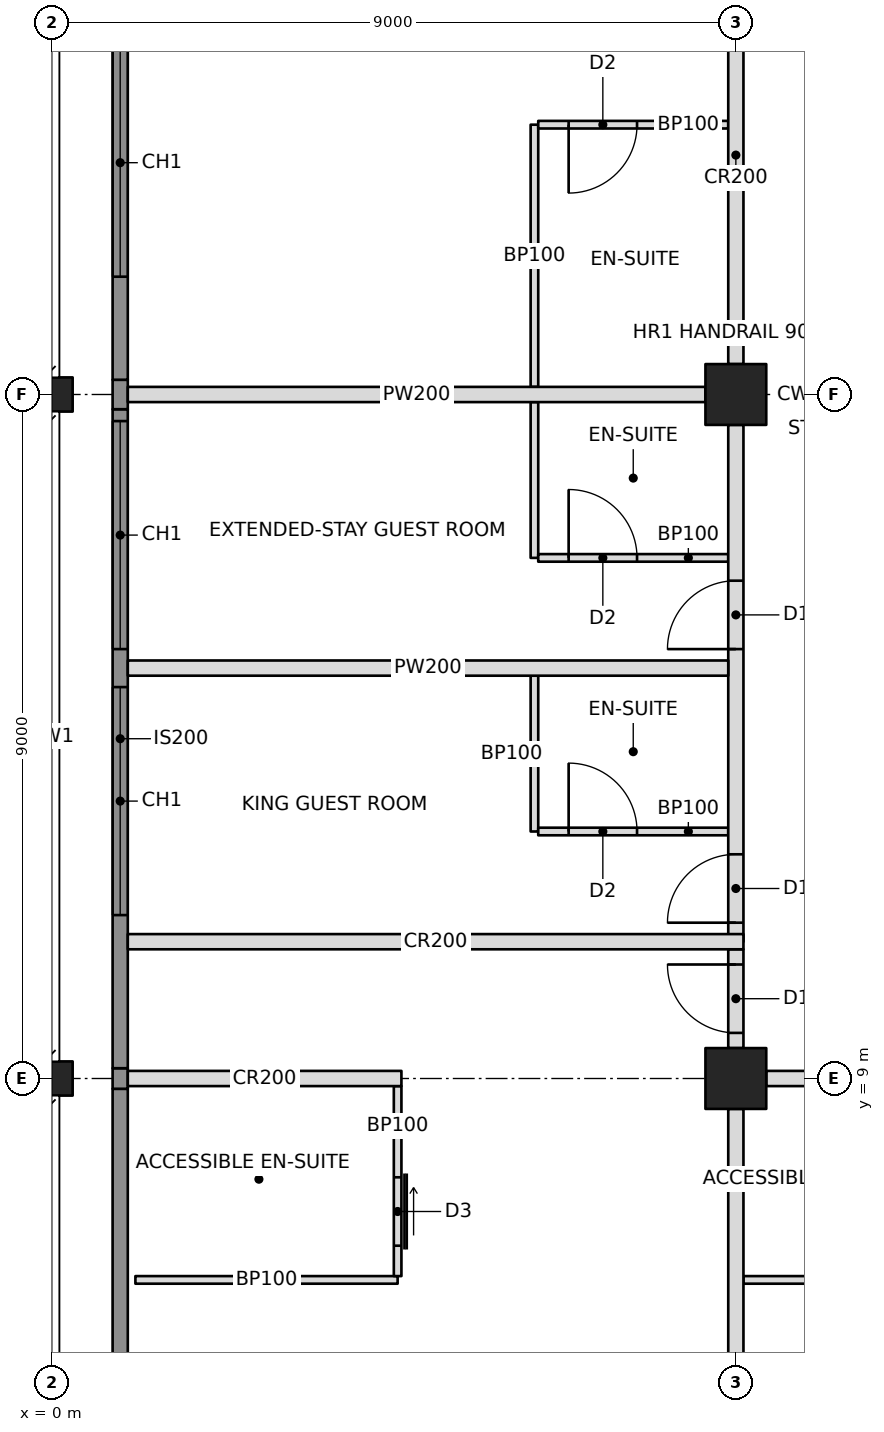
"""IFC4 building model, lengths in metres.
Left out: names, types, materials, properties, quantities, classifications, styles, units other than length and angle.
Written with IfcOpenShell. Run it as: python <this file> out.ifc"""

import sys

from ifc_helpers import new_model, si_unit, direction, frame, frame_2d, origin, origin_2d, place, context, subcontext, project, spatial, rectangle, hollow_rectangle, i_section, extrude, element, fill, save


model = new_model("IFC4")
c1 = context("Model", 3, precision=1e-05, world=origin(), true_north=direction((0.0, 1.0)))
c2 = subcontext(c1, "Body", "Model", "MODEL_VIEW")
j1 = project(units=[si_unit("LENGTHUNIT", "METRE"), si_unit("PLANEANGLEUNIT", "RADIAN")], contexts=[c1])
p1 = place(None, origin())
s1 = spatial("IfcSite", under=j1, at=p1, CompositionType="ELEMENT")
p2 = place(p1, origin())
s2 = spatial("IfcBuilding", under=s1, at=p2, CompositionType="ELEMENT")
p3 = place(p2, frame((0.0, 0.0, 167.2)))
s3 = spatial("IfcBuildingStorey", under=s2, at=p3, CompositionType="ELEMENT", Elevation=167.2)
for number, where, z_axis, x_axis in (
    (1, (0.0, 9.0, 0.0), (0.0, 0.0, 1.0), (0.0, 1.0, 0.0)),
    (2, (0.0, 18.0, 0.0), (0.0, 0.0, 1.0), (0.0, 1.0, 0.0)),
):
    element("IfcColumn", number, at=place(p3, frame(where, z_axis=z_axis, x_axis=x_axis)), inside=s3, PredefinedType="COLUMN", context=c2, shape_type="SweptSolid", body=[
        extrude(i_section(OverallWidth=0.449, OverallDepth=0.549, WebThickness=0.072, FlangeThickness=0.115, at=origin_2d()), origin(), (0.0, 0.0, 1.0), 3.4),
    ])
for number, where, z_axis, x_axis in (
    (3, (9.0, 9.0, 0.0), (0.0, 0.0, 1.0), (1.0, 0.0, 0.0)),
    (4, (9.0, 18.0, 0.0), (0.0, 0.0, 1.0), (1.0, 0.0, 0.0)),
):
    element("IfcColumn", number, at=place(p3, frame(where, z_axis=z_axis, x_axis=x_axis)), inside=s3, PredefinedType="COLUMN", context=c2, shape_type="SweptSolid", body=[
        extrude(hollow_rectangle(XDim=0.8, YDim=0.8, WallThickness=0.06, at=origin_2d()), origin(), (0.0, 0.0, 1.0), 3.4),
    ])
p4 = place(p3, frame((1.0, 9.0, 0.0), z_axis=(0.0, 0.0, 1.0), x_axis=(1.0, 0.0, 0.0)))
e5 = element("IfcWall", 5, at=p4, inside=s3, PredefinedType="PARTITIONING", context=c2, shape_type="SweptSolid", body=[
    extrude(rectangle(XDim=3.6, YDim=0.2, at=frame_2d((1.8, 0.0))), origin(), (0.0, 0.0, 1.0), 2.438),
])
p5 = place(p3, frame((9.4, 9.0, 0.0), z_axis=(0.0, 0.0, 1.0), x_axis=(1.0, 0.0, 0.0)))
e6 = element("IfcWall", 6, at=p5, inside=s3, PredefinedType="PARTITIONING", context=c2, shape_type="SweptSolid", body=[
    extrude(rectangle(XDim=8.2, YDim=0.2, at=frame_2d((4.1, 0.0))), origin(), (0.0, 0.0, 1.0), 2.405),
])
p6 = place(p5, frame((2.95, 0.0, 0.0)))
e7 = element("IfcOpeningElement", 7, at=p6, cuts=e6, PredefinedType="OPENING", context=c2, shape_type="SweptSolid", body=[
    extrude(rectangle(XDim=0.9, YDim=2.1, at=frame_2d((0.45, 1.05))), frame((0.0, 0.11, 0.0), z_axis=(0.0, -1.0, 0.0), x_axis=(1.0, 0.0, 0.0)), (0.0, 0.0, 1.0), 0.22),
])
p7 = place(p5, frame((4.35, 0.0, 0.0)))
e8 = element("IfcOpeningElement", 8, at=p7, cuts=e6, PredefinedType="OPENING", context=c2, shape_type="SweptSolid", body=[
    extrude(rectangle(XDim=0.9, YDim=2.1, at=frame_2d((0.45, 1.05))), frame((0.0, 0.11, 0.0), z_axis=(0.0, -1.0, 0.0), x_axis=(1.0, 0.0, 0.0)), (0.0, 0.0, 1.0), 0.22),
])
p8 = place(p3, frame((9.0, 10.8, 0.0), z_axis=(0.0, 0.0, 1.0), x_axis=(0.0, 1.0, 0.0)))
e9 = element("IfcWall", 9, at=p8, inside=s3, PredefinedType="PARTITIONING", context=c2, shape_type="SweptSolid", body=[
    extrude(rectangle(XDim=6.8, YDim=0.2, at=frame_2d((3.4, 0.0))), origin(), (0.0, 0.0, 1.0), 2.405),
])
p9 = place(p8, frame((0.25, 0.0, 0.0)))
e10 = element("IfcOpeningElement", 10, at=p9, cuts=e9, PredefinedType="OPENING", context=c2, shape_type="SweptSolid", body=[
    extrude(rectangle(XDim=0.9, YDim=2.1, at=frame_2d((0.45, 1.05))), frame((0.0, 0.11, 0.0), z_axis=(0.0, -1.0, 0.0), x_axis=(1.0, 0.0, 0.0)), (0.0, 0.0, 1.0), 0.22),
])
p10 = place(p8, frame((3.85, 0.0, 0.0)))
e11 = element("IfcOpeningElement", 11, at=p10, cuts=e9, PredefinedType="OPENING", context=c2, shape_type="SweptSolid", body=[
    extrude(rectangle(XDim=0.9, YDim=2.1, at=frame_2d((0.45, 1.05))), frame((0.0, 0.11, 0.0), z_axis=(0.0, -1.0, 0.0), x_axis=(1.0, 0.0, 0.0)), (0.0, 0.0, 1.0), 0.22),
])
p11 = place(p3, frame((9.0, 18.4, 0.0), z_axis=(0.0, 0.0, 1.0), x_axis=(0.0, 1.0, 0.0)))
e12 = element("IfcWall", 12, at=p11, inside=s3, PredefinedType="PARTITIONING", context=c2, shape_type="SweptSolid", body=[
    extrude(rectangle(XDim=8.2, YDim=0.2, at=frame_2d((4.1, 0.0))), origin(), (0.0, 0.0, 1.0), 2.405),
])
p12 = place(p11, frame((5.65, 0.0, 0.0)))
e13 = element("IfcOpeningElement", 13, at=p12, cuts=e12, PredefinedType="OPENING", context=c2, shape_type="SweptSolid", body=[
    extrude(rectangle(XDim=0.9, YDim=2.1, at=frame_2d((0.45, 1.05))), frame((0.0, 0.11, 0.0), z_axis=(0.0, -1.0, 0.0), x_axis=(1.0, 0.0, 0.0)), (0.0, 0.0, 1.0), 0.22),
])
p13 = place(p3, frame((1.0, 10.8, 0.0), z_axis=(0.0, 0.0, 1.0), x_axis=(1.0, 0.0, 0.0)))
e14 = element("IfcWall", 14, at=p13, inside=s3, PredefinedType="PARTITIONING", context=c2, shape_type="SweptSolid", body=[
    extrude(rectangle(XDim=8.1, YDim=0.2, at=frame_2d((4.05, 0.0))), origin(), (0.0, 0.0, 1.0), 2.404),
])
p14 = place(p3, frame((9.0, 8.6, 0.0), z_axis=(0.0, 0.0, 1.0), x_axis=(0.0, -1.0, 0.0)))
e15 = element("IfcWall", 15, at=p14, inside=s3, PredefinedType="PARTITIONING", context=c2, shape_type="SweptSolid", body=[
    extrude(rectangle(XDim=7.6, YDim=0.2, at=frame_2d((3.8, 0.0))), origin(), (0.0, 0.0, 1.0), 2.438),
])
p15 = place(p3, frame((1.1, 6.35, 0.0), z_axis=(0.0, 0.0, 1.0), x_axis=(1.0, 0.0, 0.0)))
e16 = element("IfcWall", 16, at=p15, inside=s3, PredefinedType="PARTITIONING", context=c2, shape_type="SweptSolid", body=[
    extrude(rectangle(XDim=3.45, YDim=0.1, at=frame_2d((1.725, 0.0))), origin(), (0.0, 0.0, 1.0), 3.2),
])
p16 = place(p3, frame((4.55, 8.9, 0.0), z_axis=(0.0, 0.0, 1.0), x_axis=(0.0, -1.0, 0.0)))
e17 = element("IfcWall", 17, at=p16, inside=s3, PredefinedType="PARTITIONING", context=c2, shape_type="SweptSolid", body=[
    extrude(rectangle(XDim=2.5, YDim=0.1, at=frame_2d((1.25, 0.0))), origin(), (0.0, 0.0, 1.0), 2.438),
])
p17 = place(p16, frame((1.2, 0.0, 0.0)))
e18 = element("IfcOpeningElement", 18, at=p17, cuts=e17, PredefinedType="OPENING", context=c2, shape_type="SweptSolid", body=[
    extrude(rectangle(XDim=0.9, YDim=2.1, at=frame_2d((0.45, 1.05))), frame((0.0, 0.06, 0.0), z_axis=(0.0, -1.0, 0.0), x_axis=(1.0, 0.0, 0.0)), (0.0, 0.0, 1.0), 0.12),
])
p18 = place(p3, frame((9.1, 6.35, 0.0), z_axis=(0.0, 0.0, 1.0), x_axis=(1.0, 0.0, 0.0)))
e19 = element("IfcWall", 19, at=p18, inside=s3, PredefinedType="PARTITIONING", context=c2, shape_type="SweptSolid", body=[
    extrude(rectangle(XDim=2.95, YDim=0.1, at=frame_2d((1.475, 0.0))), origin(), (0.0, 0.0, 1.0), 2.438),
])
p19 = place(p3, frame((8.9, 14.4, 0.0), z_axis=(0.0, 0.0, 1.0), x_axis=(-1.0, 0.0, 0.0)))
e20 = element("IfcWall", 20, at=p19, inside=s3, PredefinedType="PARTITIONING", context=c2, shape_type="SweptSolid", body=[
    extrude(rectangle(XDim=7.9, YDim=0.2, at=frame_2d((3.95, 0.0))), origin(), (0.0, 0.0, 1.0), 2.404),
])
p20 = place(p3, frame((8.6, 18.0, 0.0), z_axis=(0.0, 0.0, 1.0), x_axis=(-1.0, 0.0, 0.0)))
e21 = element("IfcWall", 21, at=p20, inside=s3, PredefinedType="PARTITIONING", context=c2, shape_type="SweptSolid", body=[
    extrude(rectangle(XDim=7.6, YDim=0.2, at=frame_2d((3.8, 0.0))), origin(), (0.0, 0.0, 1.0), 2.405),
])
p21 = place(p3, frame((6.35, 12.25, 0.0), z_axis=(0.0, 0.0, 1.0), x_axis=(0.0, 1.0, 0.0)))
e22 = element("IfcWall", 22, at=p21, inside=s3, PredefinedType="PARTITIONING", context=c2, shape_type="SweptSolid", body=[
    extrude(rectangle(XDim=2.05, YDim=0.1, at=frame_2d((1.025, 0.0))), origin(), (0.0, 0.0, 1.0), 3.2),
])
p22 = place(p3, frame((8.9, 12.25, 0.0), z_axis=(0.0, 0.0, 1.0), x_axis=(-1.0, 0.0, 0.0)))
e23 = element("IfcWall", 23, at=p22, inside=s3, PredefinedType="PARTITIONING", context=c2, shape_type="SweptSolid", body=[
    extrude(rectangle(XDim=2.5, YDim=0.1, at=frame_2d((1.25, 0.0))), origin(), (0.0, 0.0, 1.0), 2.404),
])
p23 = place(p22, frame((1.2, 0.0, 0.0)))
e24 = element("IfcOpeningElement", 24, at=p23, cuts=e23, PredefinedType="OPENING", context=c2, shape_type="SweptSolid", body=[
    extrude(rectangle(XDim=0.9, YDim=2.1, at=frame_2d((0.45, 1.05))), frame((0.0, 0.06, 0.0), z_axis=(0.0, -1.0, 0.0), x_axis=(1.0, 0.0, 0.0)), (0.0, 0.0, 1.0), 0.12),
])
p24 = place(p3, frame((6.35, 15.85, 0.0), z_axis=(0.0, 0.0, 1.0), x_axis=(0.0, 1.0, 0.0)))
e25 = element("IfcWall", 25, at=p24, inside=s3, PredefinedType="PARTITIONING", context=c2, shape_type="SweptSolid", body=[
    extrude(rectangle(XDim=2.05, YDim=0.1, at=frame_2d((1.025, 0.0))), origin(), (0.0, 0.0, 1.0), 2.404),
])
p25 = place(p3, frame((8.9, 15.85, 0.0), z_axis=(0.0, 0.0, 1.0), x_axis=(-1.0, 0.0, 0.0)))
e26 = element("IfcWall", 26, at=p25, inside=s3, PredefinedType="PARTITIONING", context=c2, shape_type="SweptSolid", body=[
    extrude(rectangle(XDim=2.5, YDim=0.1, at=frame_2d((1.25, 0.0))), origin(), (0.0, 0.0, 1.0), 2.404),
])
p26 = place(p25, frame((1.2, 0.0, 0.0)))
e27 = element("IfcOpeningElement", 27, at=p26, cuts=e26, PredefinedType="OPENING", context=c2, shape_type="SweptSolid", body=[
    extrude(rectangle(XDim=0.9, YDim=2.1, at=frame_2d((0.45, 1.05))), frame((0.0, 0.06, 0.0), z_axis=(0.0, -1.0, 0.0), x_axis=(1.0, 0.0, 0.0)), (0.0, 0.0, 1.0), 0.12),
])
p27 = place(p3, frame((6.35, 18.1, 0.0), z_axis=(0.0, 0.0, 1.0), x_axis=(0.0, 1.0, 0.0)))
e28 = element("IfcWall", 28, at=p27, inside=s3, PredefinedType="PARTITIONING", context=c2, shape_type="SweptSolid", body=[
    extrude(rectangle(XDim=3.45, YDim=0.1, at=frame_2d((1.725, 0.0))), origin(), (0.0, 0.0, 1.0), 2.404),
])
p28 = place(p3, frame((8.9, 21.55, 0.0), z_axis=(0.0, 0.0, 1.0), x_axis=(-1.0, 0.0, 0.0)))
e29 = element("IfcWall", 29, at=p28, inside=s3, PredefinedType="PARTITIONING", context=c2, shape_type="SweptSolid", body=[
    extrude(rectangle(XDim=2.5, YDim=0.1, at=frame_2d((1.25, 0.0))), origin(), (0.0, 0.0, 1.0), 2.404),
])
p29 = place(p28, frame((1.2, 0.0, 0.0)))
e30 = element("IfcOpeningElement", 30, at=p29, cuts=e29, PredefinedType="OPENING", context=c2, shape_type="SweptSolid", body=[
    extrude(rectangle(XDim=0.9, YDim=2.1, at=frame_2d((0.45, 1.05))), frame((0.0, 0.06, 0.0), z_axis=(0.0, -1.0, 0.0), x_axis=(1.0, 0.0, 0.0)), (0.0, 0.0, 1.0), 0.12),
])
p30 = place(p3, frame((9.0, 9.4, 0.0), z_axis=(0.0, 0.0, 1.0), x_axis=(0.0, 1.0, 0.0)))
e31 = element("IfcWall", 31, at=p30, inside=s3, PredefinedType="PARTITIONING", context=c2, shape_type="SweptSolid", body=[
    extrude(rectangle(XDim=1.3, YDim=0.2, at=frame_2d((0.65, 0.0))), origin(), (0.0, 0.0, 1.0), 2.405),
])
p31 = place(p30, frame((0.2, 0.0, 0.0)))
e32 = element("IfcOpeningElement", 32, at=p31, cuts=e31, PredefinedType="OPENING", context=c2, shape_type="SweptSolid", body=[
    extrude(rectangle(XDim=0.9, YDim=2.1, at=frame_2d((0.45, 1.05))), frame((0.0, 0.11, 0.0), z_axis=(0.0, -1.0, 0.0), x_axis=(1.0, 0.0, 0.0)), (0.0, 0.0, 1.0), 0.22),
])
p32 = place(p3, frame((0.9, 4.607, 0.0), z_axis=(0.0, 0.0, 1.0), x_axis=(0.0, 1.0, 0.0)))
e33 = element("IfcWall", 33, at=p32, inside=s3, PredefinedType="SOLIDWALL", context=c2, shape_type="SweptSolid", body=[
    extrude(rectangle(XDim=4.257, YDim=0.2, at=frame_2d((2.129, 0.0))), origin(), (0.0, 0.0, 1.0), 3.2),
])
p33 = place(p3, frame((0.9, 8.865, 0.0), z_axis=(0.0, 0.0, 1.0), x_axis=(0.0, 1.0, 0.0)))
e34 = element("IfcWall", 34, at=p33, inside=s3, PredefinedType="SOLIDWALL", context=c2, shape_type="SweptSolid", body=[
    extrude(rectangle(XDim=0.271, YDim=0.2, at=frame_2d((0.135, 0.0))), origin(), (0.0, 0.0, 1.0), 2.438),
])
p34 = place(p3, frame((0.9, 9.135, 0.0), z_axis=(0.0, 0.0, 1.0), x_axis=(0.0, 1.0, 0.0)))
e35 = element("IfcWall", 35, at=p34, inside=s3, PredefinedType="SOLIDWALL", context=c2, shape_type="SweptSolid", body=[
    extrude(rectangle(XDim=8.671, YDim=0.2, at=frame_2d((4.335, 0.0))), origin(), (0.0, 0.0, 1.0), 3.2),
])
p35 = place(p34, frame((2.015, 0.0, 0.6)))
e36 = element("IfcOpeningElement", 36, at=p35, cuts=e35, PredefinedType="OPENING", context=c2, shape_type="SweptSolid", body=[
    extrude(rectangle(XDim=3.0, YDim=2.2, at=frame_2d((1.5, 1.1))), frame((0.0, 0.11, 0.0), z_axis=(0.0, -1.0, 0.0), x_axis=(1.0, 0.0, 0.0)), (0.0, 0.0, 1.0), 0.22),
])
p36 = place(p34, frame((5.515, 0.0, 0.6)))
e37 = element("IfcOpeningElement", 37, at=p36, cuts=e35, PredefinedType="OPENING", context=c2, shape_type="SweptSolid", body=[
    extrude(rectangle(XDim=3.0, YDim=2.2, at=frame_2d((1.5, 1.1))), frame((0.0, 0.11, 0.0), z_axis=(0.0, -1.0, 0.0), x_axis=(1.0, 0.0, 0.0)), (0.0, 0.0, 1.0), 0.22),
])
p37 = place(p3, frame((0.9, 17.806, 0.0), z_axis=(0.0, 0.0, 1.0), x_axis=(0.0, 1.0, 0.0)))
e38 = element("IfcWall", 38, at=p37, inside=s3, PredefinedType="SOLIDWALL", context=c2, shape_type="SweptSolid", body=[
    extrude(rectangle(XDim=0.388, YDim=0.2, at=frame_2d((0.194, 0.0))), origin(), (0.0, 0.0, 1.0), 2.404),
])
p38 = place(p3, frame((0.9, 18.194, 0.0), z_axis=(0.0, 0.0, 1.0), x_axis=(0.0, 1.0, 0.0)))
e39 = element("IfcWall", 39, at=p38, inside=s3, PredefinedType="SOLIDWALL", context=c2, shape_type="SweptSolid", body=[
    extrude(rectangle(XDim=5.806, YDim=0.2, at=frame_2d((2.903, 0.0))), origin(), (0.0, 0.0, 1.0), 3.2),
])
p39 = place(p38, frame((1.356, 0.0, 0.6)))
e40 = element("IfcOpeningElement", 40, at=p39, cuts=e39, PredefinedType="OPENING", context=c2, shape_type="SweptSolid", body=[
    extrude(rectangle(XDim=3.0, YDim=2.2, at=frame_2d((1.5, 1.1))), frame((0.0, 0.11, 0.0), z_axis=(0.0, -1.0, 0.0), x_axis=(1.0, 0.0, 0.0)), (0.0, 0.0, 1.0), 0.22),
])
p40 = place(p35, origin())
e41 = element("IfcWindow", 41, at=p40, inside=s3, PartitioningType="TRIPLE_PANEL_VERTICAL", PredefinedType="WINDOW", context=c2, shape_type="SweptSolid", body=[
    extrude(rectangle(XDim=3.0, YDim=2.2, at=frame_2d((1.5, 1.1))), frame((0.0, 0.03, 0.0), z_axis=(0.0, -1.0, 0.0), x_axis=(1.0, 0.0, 0.0)), (0.0, 0.0, 1.0), 0.06),
])
fill(e36, e41)
p41 = place(p36, origin())
e42 = element("IfcWindow", 42, at=p41, inside=s3, PartitioningType="TRIPLE_PANEL_VERTICAL", PredefinedType="WINDOW", context=c2, shape_type="SweptSolid", body=[
    extrude(rectangle(XDim=3.0, YDim=2.2, at=frame_2d((1.5, 1.1))), frame((0.0, 0.03, 0.0), z_axis=(0.0, -1.0, 0.0), x_axis=(1.0, 0.0, 0.0)), (0.0, 0.0, 1.0), 0.06),
])
fill(e37, e42)
p42 = place(p39, origin())
e43 = element("IfcWindow", 43, at=p42, inside=s3, PartitioningType="TRIPLE_PANEL_VERTICAL", PredefinedType="WINDOW", context=c2, shape_type="SweptSolid", body=[
    extrude(rectangle(XDim=3.0, YDim=2.2, at=frame_2d((1.5, 1.1))), frame((0.0, 0.03, 0.0), z_axis=(0.0, -1.0, 0.0), x_axis=(1.0, 0.0, 0.0)), (0.0, 0.0, 1.0), 0.06),
])
fill(e40, e43)
p43 = place(p17, origin())
e44 = element("IfcDoor", 44, at=p43, inside=s3, OperationType="SLIDING_TO_LEFT", PredefinedType="DOOR", context=c2, shape_type="SweptSolid", body=[
    extrude(rectangle(XDim=0.9, YDim=2.1, at=frame_2d((0.45, 1.05))), frame((0.0, 0.025, 0.0), z_axis=(0.0, -1.0, 0.0), x_axis=(1.0, 0.0, 0.0)), (0.0, 0.0, 1.0), 0.05),
])
fill(e18, e44)
p44 = place(p23, frame((0.9, 0.0, 0.0), z_axis=(0.0, 0.0, 1.0), x_axis=(-1.0, 0.0, 0.0)))
e45 = element("IfcDoor", 45, at=p44, inside=s3, OperationType="SINGLE_SWING_LEFT", PredefinedType="DOOR", context=c2, shape_type="SweptSolid", body=[
    extrude(rectangle(XDim=0.9, YDim=2.1, at=frame_2d((0.45, 1.05))), frame((0.0, 0.025, 0.0), z_axis=(0.0, -1.0, 0.0), x_axis=(1.0, 0.0, 0.0)), (0.0, 0.0, 1.0), 0.05),
])
fill(e24, e45)
p45 = place(p9, origin())
e46 = element("IfcDoor", 46, at=p45, inside=s3, OperationType="SINGLE_SWING_LEFT", PredefinedType="DOOR", context=c2, shape_type="SweptSolid", body=[
    extrude(rectangle(XDim=0.9, YDim=2.1, at=frame_2d((0.45, 1.05))), frame((0.0, 0.025, 0.0), z_axis=(0.0, -1.0, 0.0), x_axis=(1.0, 0.0, 0.0)), (0.0, 0.0, 1.0), 0.05),
])
fill(e10, e46)
p46 = place(p26, frame((0.9, 0.0, 0.0), z_axis=(0.0, 0.0, 1.0), x_axis=(-1.0, 0.0, 0.0)))
e47 = element("IfcDoor", 47, at=p46, inside=s3, OperationType="SINGLE_SWING_LEFT", PredefinedType="DOOR", context=c2, shape_type="SweptSolid", body=[
    extrude(rectangle(XDim=0.9, YDim=2.1, at=frame_2d((0.45, 1.05))), frame((0.0, 0.025, 0.0), z_axis=(0.0, -1.0, 0.0), x_axis=(1.0, 0.0, 0.0)), (0.0, 0.0, 1.0), 0.05),
])
fill(e27, e47)
p47 = place(p10, origin())
e48 = element("IfcDoor", 48, at=p47, inside=s3, OperationType="SINGLE_SWING_LEFT", PredefinedType="DOOR", context=c2, shape_type="SweptSolid", body=[
    extrude(rectangle(XDim=0.9, YDim=2.1, at=frame_2d((0.45, 1.05))), frame((0.0, 0.025, 0.0), z_axis=(0.0, -1.0, 0.0), x_axis=(1.0, 0.0, 0.0)), (0.0, 0.0, 1.0), 0.05),
])
fill(e11, e48)
p48 = place(p29, origin())
e49 = element("IfcDoor", 49, at=p48, inside=s3, OperationType="SINGLE_SWING_RIGHT", PredefinedType="DOOR", context=c2, shape_type="SweptSolid", body=[
    extrude(rectangle(XDim=0.9, YDim=2.1, at=frame_2d((0.45, 1.05))), frame((0.0, 0.025, 0.0), z_axis=(0.0, -1.0, 0.0), x_axis=(1.0, 0.0, 0.0)), (0.0, 0.0, 1.0), 0.05),
])
fill(e30, e49)
p49 = place(p31, origin())
e50 = element("IfcDoor", 50, at=p49, inside=s3, OperationType="SINGLE_SWING_RIGHT", PredefinedType="DOOR", context=c2, shape_type="SweptSolid", body=[
    extrude(rectangle(XDim=0.9, YDim=2.1, at=frame_2d((0.45, 1.05))), frame((0.0, 0.025, 0.0), z_axis=(0.0, -1.0, 0.0), x_axis=(1.0, 0.0, 0.0)), (0.0, 0.0, 1.0), 0.05),
])
fill(e32, e50)
save(model, sys.argv[1])
